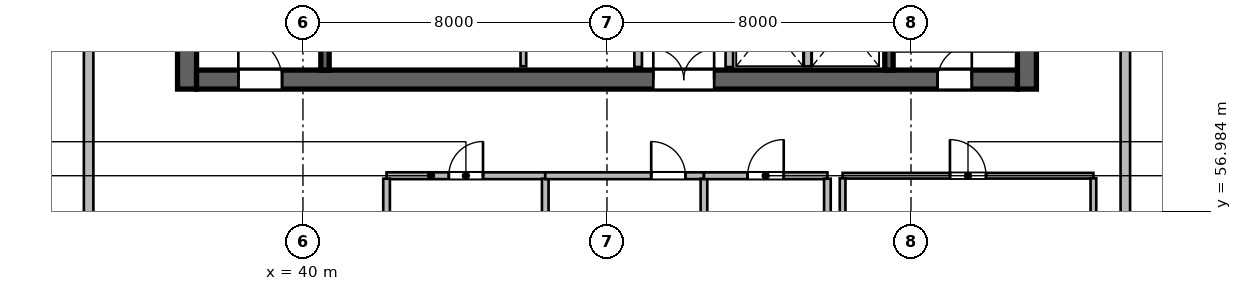
"""IFC4 building model, lengths in metres.
Left out: names, types, materials, properties, quantities, classifications, styles, units other than length and angle.
Written with IfcOpenShell. Run it as: python <this file> out.ifc"""

import sys

from ifc_helpers import new_model, si_unit, direction, frame, frame_2d, origin, place, context, subcontext, project, spatial, rectangle, extrude, source, transform, mapped, element, fill, save


model = new_model("IFC4")
c1 = context("Model", 3, precision=1e-05, world=origin(), true_north=direction((0.0, 1.0)))
c2 = subcontext(c1, "Body", "Model", "MODEL_VIEW")
j1 = project(units=[si_unit("LENGTHUNIT", "METRE"), si_unit("PLANEANGLEUNIT", "RADIAN")], contexts=[c1])
p1 = place(None, origin())
s1 = spatial("IfcSite", under=j1, at=p1, CompositionType="ELEMENT")
p2 = place(p1, origin())
s2 = spatial("IfcBuilding", under=s1, at=p2, CompositionType="ELEMENT")
p3 = place(p2, frame((0.0, 0.0, 177.9)))
s3 = spatial("IfcBuildingStorey", under=s2, at=p3, CompositionType="ELEMENT", Elevation=177.9)
m1 = source(origin(), c2, "Body", "SweptSolid", [
    extrude(rectangle(XDim=12.0, YDim=0.5, at=frame_2d((6.0, 0.0))), origin(), (0.0, 0.0, 1.0), 3.9),
])
for number, where, z_axis, x_axis in (
    (1, (36.95, 60.2, 0.0), (0.0, 0.0, 1.0), (0.0, 1.0, 0.0)),
    (2, (59.05, 60.2, 0.0), (0.0, 0.0, 1.0), (0.0, 1.0, 0.0)),
):
    element("IfcWall", number, at=place(p3, frame(where, z_axis=z_axis, x_axis=x_axis)), inside=s3, PredefinedType="SHEAR", context=c2, shape_type="MappedRepresentation", body=[
        mapped(m1, transform((0.0, 0.0, 0.0), scale=1.0)),
    ])
m2 = source(origin(), c2, "Body", "SweptSolid", [
    extrude(rectangle(XDim=21.6, YDim=0.5, at=frame_2d((10.8, 0.0))), origin(), (0.0, 0.0, 1.0), 3.9),
])
p4 = place(p3, frame((37.2, 60.45, 0.0), z_axis=(0.0, 0.0, 1.0), x_axis=(1.0, 0.0, 0.0)))
e3 = element("IfcWall", 3, at=p4, inside=s3, PredefinedType="SHEAR", context=c2, shape_type="MappedRepresentation", body=[
    mapped(m2, transform((0.0, 0.0, 0.0), scale=1.0)),
])
p5 = place(p4, frame((1.1, 0.0, 0.0)))
e4 = element("IfcOpeningElement", 4, at=p5, cuts=e3, PredefinedType="OPENING", context=c2, shape_type="SweptSolid", body=[
    extrude(rectangle(XDim=1.15, YDim=2.15, at=frame_2d((0.575, 1.075))), frame((0.0, 0.26, 0.0), z_axis=(0.0, -1.0, 0.0), x_axis=(1.0, 0.0, 0.0)), (0.0, 0.0, 1.0), 0.52),
])
p6 = place(p4, frame((19.5, 0.0, 0.0)))
e5 = element("IfcOpeningElement", 5, at=p6, cuts=e3, PredefinedType="OPENING", context=c2, shape_type="SweptSolid", body=[
    extrude(rectangle(XDim=0.9, YDim=2.1, at=frame_2d((0.45, 1.05))), frame((0.0, 0.26, 0.0), z_axis=(0.0, -1.0, 0.0), x_axis=(1.0, 0.0, 0.0)), (0.0, 0.0, 1.0), 0.52),
])
p7 = place(p4, frame((12.02, 0.0, 0.0)))
e6 = element("IfcOpeningElement", 6, at=p7, cuts=e3, PredefinedType="OPENING", context=c2, shape_type="SweptSolid", body=[
    extrude(rectangle(XDim=1.6, YDim=2.15, at=frame_2d((0.8, 1.075))), frame((0.0, 0.26, 0.0), z_axis=(0.0, -1.0, 0.0), x_axis=(1.0, 0.0, 0.0)), (0.0, 0.0, 1.0), 0.52),
])
m3 = source(origin(), c2, "Body", "SweptSolid", [
    extrude(rectangle(XDim=11.0, YDim=0.22, at=frame_2d((5.5, 0.0))), origin(), (0.0, 0.0, 1.0), 3.9),
])
p8 = place(p3, frame((40.58, 60.7, 0.0), z_axis=(0.0, 0.0, 1.0), x_axis=(0.0, 1.0, 0.0)))
e7 = element("IfcWall", 7, at=p8, inside=s3, PredefinedType="SHEAR", context=c2, shape_type="MappedRepresentation", body=[
    mapped(m3, transform((0.0, 0.0, 0.0), scale=1.0)),
])
p9 = place(p3, frame((55.42, 60.7, 0.0), z_axis=(0.0, 0.0, 1.0), x_axis=(0.0, 1.0, 0.0)))
e8 = element("IfcWall", 8, at=p9, inside=s3, PredefinedType="SHEAR", context=c2, shape_type="MappedRepresentation", body=[
    mapped(m3, transform((0.0, 0.0, 0.0), scale=1.0)),
])
p10 = place(p9, frame((9.545, 0.0, 0.0)))
e9 = element("IfcOpeningElement", 9, at=p10, cuts=e8, PredefinedType="OPENING", context=c2, shape_type="SweptSolid", body=[
    extrude(rectangle(XDim=1.15, YDim=2.15, at=frame_2d((0.575, 1.075))), frame((0.0, 0.12, 0.0), z_axis=(0.0, -1.0, 0.0), x_axis=(1.0, 0.0, 0.0)), (0.0, 0.0, 1.0), 0.24),
])
m4 = source(origin(), c2, "Body", "SweptSolid", [
    extrude(rectangle(XDim=2.24, YDim=0.2, at=frame_2d((1.12, 0.0))), origin(), (0.0, 0.0, 1.0), 3.65),
])
for number, where, z_axis, x_axis in (
    (10, (48.82, 60.78, 0.0), (0.0, 0.0, 1.0), (0.0, 1.0, 0.0)),
    (11, (51.22, 60.78, 0.0), (0.0, 0.0, 1.0), (0.0, 1.0, 0.0)),
):
    element("IfcWall", number, at=place(p3, frame(where, z_axis=z_axis, x_axis=x_axis)), inside=s3, PredefinedType="SOLIDWALL", context=c2, shape_type="MappedRepresentation", body=[
        mapped(m4, transform((0.0, 0.0, 0.0), scale=1.0)),
    ])
m5 = source(origin(), c2, "Body", "SweptSolid", [
    extrude(rectangle(XDim=2.2, YDim=0.15, at=frame_2d((1.1, 0.0))), origin(), (0.0, 0.0, 1.0), 3.65),
])
p11 = place(p3, frame((45.8, 60.8, 0.0), z_axis=(0.0, 0.0, 1.0), x_axis=(0.0, 1.0, 0.0)))
e12 = element("IfcWall", 12, at=p11, inside=s3, PredefinedType="PARTITIONING", context=c2, shape_type="MappedRepresentation", body=[
    mapped(m5, transform((0.0, 0.0, 0.0), scale=1.0)),
])
m6 = source(origin(), c2, "Body", "SweptSolid", [
    extrude(rectangle(XDim=2.2, YDim=0.2, at=frame_2d((1.1, 0.0))), origin(), (0.0, 0.0, 1.0), 3.65),
])
p12 = place(p3, frame((53.28, 60.8, 0.0), z_axis=(0.0, 0.0, 1.0), x_axis=(0.0, 1.0, 0.0)))
e13 = element("IfcWall", 13, at=p12, inside=s3, PredefinedType="SOLIDWALL", context=c2, shape_type="MappedRepresentation", body=[
    mapped(m6, transform((0.0, 0.0, 0.0), scale=1.0)),
])
m7 = source(origin(), c2, "Body", "SweptSolid", [
    extrude(rectangle(XDim=4.176, YDim=0.18, at=frame_2d((2.088, 0.0))), origin(), (0.0, 0.0, 1.0), 3.65),
])
p13 = place(p3, frame((42.2, 57.92, 0.0), z_axis=(0.0, 0.0, 1.0), x_axis=(1.0, 0.0, 0.0)))
e14 = element("IfcWall", 14, at=p13, inside=s3, PredefinedType="PLUMBINGWALL", context=c2, shape_type="MappedRepresentation", body=[
    mapped(m7, transform((0.0, 0.0, 0.0), scale=1.0)),
])
p14 = place(p13, frame((1.638, 0.0, 0.0)))
e15 = element("IfcOpeningElement", 15, at=p14, cuts=e14, PredefinedType="OPENING", context=c2, shape_type="SweptSolid", body=[
    extrude(rectangle(XDim=0.9, YDim=2.08, at=frame_2d((0.45, 1.04))), frame((0.0, 0.1, 0.0), z_axis=(0.0, -1.0, 0.0), x_axis=(1.0, 0.0, 0.0)), (0.0, 0.0, 1.0), 0.2),
])
m8 = source(origin(), c2, "Body", "SweptSolid", [
    extrude(rectangle(XDim=3.763, YDim=0.175, at=frame_2d((1.881, 0.0))), origin(), (0.0, 0.0, 1.0), 3.65),
])
p15 = place(p3, frame((42.2, 54.079, 0.0), z_axis=(0.0, 0.0, 1.0), x_axis=(0.0, 1.0, 0.0)))
e16 = element("IfcWall", 16, at=p15, inside=s3, PredefinedType="PARTITIONING", context=c2, shape_type="MappedRepresentation", body=[
    mapped(m8, transform((0.0, 0.0, 0.0), scale=1.0)),
])
m9 = source(origin(), c2, "Body", "SweptSolid", [
    extrude(rectangle(XDim=3.065, YDim=0.175, at=frame_2d((1.533, 0.0))), origin(), (0.0, 0.0, 1.0), 3.65),
])
p16 = place(p3, frame((46.376, 54.776, 0.0), z_axis=(0.0, 0.0, 1.0), x_axis=(0.0, 1.0, 0.0)))
e17 = element("IfcWall", 17, at=p16, inside=s3, PredefinedType="PARTITIONING", context=c2, shape_type="MappedRepresentation", body=[
    mapped(m9, transform((0.0, 0.0, 0.0), scale=1.0)),
])
p17 = place(p3, frame((46.376, 57.92, 0.0), z_axis=(0.0, 0.0, 1.0), x_axis=(1.0, 0.0, 0.0)))
e18 = element("IfcWall", 18, at=p17, inside=s3, PredefinedType="PLUMBINGWALL", context=c2, shape_type="MappedRepresentation", body=[
    mapped(m7, transform((0.0, 0.0, 0.0), scale=1.0)),
])
p18 = place(p17, frame((2.788, 0.0, 0.0)))
e19 = element("IfcOpeningElement", 19, at=p18, cuts=e18, PredefinedType="OPENING", context=c2, shape_type="SweptSolid", body=[
    extrude(rectangle(XDim=0.9, YDim=2.08, at=frame_2d((0.45, 1.04))), frame((0.0, 0.1, 0.0), z_axis=(0.0, -1.0, 0.0), x_axis=(1.0, 0.0, 0.0)), (0.0, 0.0, 1.0), 0.2),
])
m10 = source(origin(), c2, "Body", "SweptSolid", [
    extrude(rectangle(XDim=3.136, YDim=0.175, at=frame_2d((1.568, 0.0))), origin(), (0.0, 0.0, 1.0), 3.65),
])
p19 = place(p3, frame((50.552, 54.705, 0.0), z_axis=(0.0, 0.0, 1.0), x_axis=(0.0, 1.0, 0.0)))
e20 = element("IfcWall", 20, at=p19, inside=s3, PredefinedType="PARTITIONING", context=c2, shape_type="MappedRepresentation", body=[
    mapped(m10, transform((0.0, 0.0, 0.0), scale=1.0)),
])
m11 = source(origin(), c2, "Body", "SweptSolid", [
    extrude(rectangle(XDim=3.248, YDim=0.18, at=frame_2d((1.624, 0.0))), origin(), (0.0, 0.0, 1.0), 3.65),
])
p20 = place(p3, frame((50.552, 57.92, 0.0), z_axis=(0.0, 0.0, 1.0), x_axis=(1.0, 0.0, 0.0)))
e21 = element("IfcWall", 21, at=p20, inside=s3, PredefinedType="PLUMBINGWALL", context=c2, shape_type="MappedRepresentation", body=[
    mapped(m11, transform((0.0, 0.0, 0.0), scale=1.0)),
])
p21 = place(p20, frame((1.149, 0.0, 0.0)))
e22 = element("IfcOpeningElement", 22, at=p21, cuts=e21, PredefinedType="OPENING", context=c2, shape_type="SweptSolid", body=[
    extrude(rectangle(XDim=0.95, YDim=2.12, at=frame_2d((0.475, 1.06))), frame((0.0, 0.1, 0.0), z_axis=(0.0, -1.0, 0.0), x_axis=(1.0, 0.0, 0.0)), (0.0, 0.0, 1.0), 0.2),
])
p22 = place(p3, frame((53.8, 54.079, 0.0), z_axis=(0.0, 0.0, 1.0), x_axis=(0.0, 1.0, 0.0)))
e23 = element("IfcWall", 23, at=p22, inside=s3, PredefinedType="PARTITIONING", context=c2, shape_type="MappedRepresentation", body=[
    mapped(m8, transform((0.0, 0.0, 0.0), scale=1.0)),
])
m12 = source(origin(), c2, "Body", "SweptSolid", [
    extrude(rectangle(XDim=6.6, YDim=0.15, at=frame_2d((3.3, 0.0))), origin(), (0.0, 0.0, 1.0), 3.65),
])
p23 = place(p3, frame((54.2, 57.92, 0.0), z_axis=(0.0, 0.0, 1.0), x_axis=(1.0, 0.0, 0.0)))
e24 = element("IfcWall", 24, at=p23, inside=s3, PredefinedType="PARTITIONING", context=c2, shape_type="MappedRepresentation", body=[
    mapped(m12, transform((0.0, 0.0, 0.0), scale=1.0)),
])
p24 = place(p23, frame((2.825, 0.0, 0.0)))
e25 = element("IfcOpeningElement", 25, at=p24, cuts=e24, PredefinedType="OPENING", context=c2, shape_type="SweptSolid", body=[
    extrude(rectangle(XDim=0.95, YDim=2.1, at=frame_2d((0.475, 1.05))), frame((0.0, 0.085, 0.0), z_axis=(0.0, -1.0, 0.0), x_axis=(1.0, 0.0, 0.0)), (0.0, 0.0, 1.0), 0.17),
])
m13 = source(origin(), c2, "Body", "SweptSolid", [
    extrude(rectangle(XDim=3.785, YDim=0.15, at=frame_2d((1.893, 0.0))), origin(), (0.0, 0.0, 1.0), 3.65),
])
for number, where, z_axis, x_axis in (
    (26, (54.2, 54.067, 0.0), (0.0, 0.0, 1.0), (0.0, 1.0, 0.0)),
    (27, (60.8, 54.067, 0.0), (0.0, 0.0, 1.0), (0.0, 1.0, 0.0)),
):
    element("IfcWall", number, at=place(p3, frame(where, z_axis=z_axis, x_axis=x_axis)), inside=s3, PredefinedType="PARTITIONING", context=c2, shape_type="MappedRepresentation", body=[
        mapped(m13, transform((0.0, 0.0, 0.0), scale=1.0)),
    ])
m14 = source(origin(), c2, "Body", "SweptSolid", [
    extrude(rectangle(XDim=12.126, YDim=0.25, at=frame_2d((6.063, 0.0))), origin(), (0.0, 0.0, 1.0), 3.65),
])
p25 = place(p3, frame((34.36, 49.334, 0.0), z_axis=(0.0, 0.0, 1.0), x_axis=(0.0, 1.0, 0.0)))
e28 = element("IfcWall", 28, at=p25, inside=s3, PredefinedType="PARTITIONING", context=c2, shape_type="MappedRepresentation", body=[
    mapped(m14, transform((0.0, 0.0, 0.0), scale=1.0)),
])
m15 = source(origin(), c2, "Body", "SweptSolid", [
    extrude(rectangle(XDim=12.126, YDim=0.25, at=frame_2d((6.063, 0.0))), origin(), (0.0, 0.0, 1.0), 2.942),
])
p26 = place(p3, frame((61.64, 49.334, 0.0), z_axis=(0.0, 0.0, 1.0), x_axis=(0.0, 1.0, 0.0)))
e29 = element("IfcWall", 29, at=p26, inside=s3, PredefinedType="PARTITIONING", context=c2, shape_type="MappedRepresentation", body=[
    mapped(m15, transform((0.0, 0.0, 0.0), scale=1.0)),
])
m16 = source(origin(), c2, "Body", "SweptSolid", [
    extrude(rectangle(XDim=1.15, YDim=2.15, at=frame_2d((0.575, 1.075))), frame((0.0, 0.025, 0.0), z_axis=(0.0, -1.0, 0.0), x_axis=(1.0, 0.0, 0.0)), (0.0, 0.0, 1.0), 0.05),
])
p27 = place(p5, origin())
e30 = element("IfcDoor", 30, at=p27, inside=s3, OperationType="SINGLE_SWING_LEFT", PredefinedType="DOOR", context=c2, shape_type="MappedRepresentation", body=[
    mapped(m16, transform((0.0, 0.0, 0.0), scale=1.0)),
])
fill(e4, e30)
m17 = source(origin(), c2, "Body", "SweptSolid", [
    extrude(rectangle(XDim=0.9, YDim=2.1, at=frame_2d((0.45, 1.05))), frame((0.0, 0.025, 0.0), z_axis=(0.0, -1.0, 0.0), x_axis=(1.0, 0.0, 0.0)), (0.0, 0.0, 1.0), 0.05),
])
p28 = place(p6, origin())
e31 = element("IfcDoor", 31, at=p28, inside=s3, OperationType="SINGLE_SWING_RIGHT", PredefinedType="DOOR", context=c2, shape_type="MappedRepresentation", body=[
    mapped(m17, transform((0.0, 0.0, 0.0), scale=1.0)),
])
fill(e5, e31)
m18 = source(origin(), c2, "Body", "SweptSolid", [
    extrude(rectangle(XDim=1.6, YDim=2.15, at=frame_2d((0.8, 1.075))), frame((0.0, 0.025, 0.0), z_axis=(0.0, -1.0, 0.0), x_axis=(1.0, 0.0, 0.0)), (0.0, 0.0, 1.0), 0.05),
])
p29 = place(p7, origin())
e32 = element("IfcDoor", 32, at=p29, inside=s3, OperationType="DOUBLE_DOOR_SINGLE_SWING", PredefinedType="DOOR", context=c2, shape_type="MappedRepresentation", body=[
    mapped(m18, transform((0.0, 0.0, 0.0), scale=1.0)),
])
fill(e6, e32)
m19 = source(origin(), c2, "Body", "SweptSolid", [
    extrude(rectangle(XDim=0.9, YDim=2.08, at=frame_2d((0.45, 1.04))), frame((0.0, 0.025, 0.0), z_axis=(0.0, -1.0, 0.0), x_axis=(1.0, 0.0, 0.0)), (0.0, 0.0, 1.0), 0.05),
])
p30 = place(p14, origin())
e33 = element("IfcDoor", 33, at=p30, inside=s3, OperationType="SINGLE_SWING_RIGHT", PredefinedType="DOOR", context=c2, shape_type="MappedRepresentation", body=[
    mapped(m19, transform((0.0, 0.0, 0.0), scale=1.0)),
])
fill(e15, e33)
p31 = place(p18, origin())
e34 = element("IfcDoor", 34, at=p31, inside=s3, OperationType="SINGLE_SWING_LEFT", PredefinedType="DOOR", context=c2, shape_type="MappedRepresentation", body=[
    mapped(m19, transform((0.0, 0.0, 0.0), scale=1.0)),
])
fill(e19, e34)
m20 = source(origin(), c2, "Body", "SweptSolid", [
    extrude(rectangle(XDim=0.95, YDim=2.12, at=frame_2d((0.475, 1.06))), frame((0.0, 0.025, 0.0), z_axis=(0.0, -1.0, 0.0), x_axis=(1.0, 0.0, 0.0)), (0.0, 0.0, 1.0), 0.05),
])
p32 = place(p21, origin())
e35 = element("IfcDoor", 35, at=p32, inside=s3, OperationType="SINGLE_SWING_RIGHT", PredefinedType="DOOR", context=c2, shape_type="MappedRepresentation", body=[
    mapped(m20, transform((0.0, 0.0, 0.0), scale=1.0)),
])
fill(e22, e35)
m21 = source(origin(), c2, "Body", "SweptSolid", [
    extrude(rectangle(XDim=0.95, YDim=2.1, at=frame_2d((0.475, 1.05))), frame((0.0, 0.025, 0.0), z_axis=(0.0, -1.0, 0.0), x_axis=(1.0, 0.0, 0.0)), (0.0, 0.0, 1.0), 0.05),
])
p33 = place(p24, origin())
e36 = element("IfcDoor", 36, at=p33, inside=s3, OperationType="SINGLE_SWING_LEFT", PredefinedType="DOOR", context=c2, shape_type="MappedRepresentation", body=[
    mapped(m21, transform((0.0, 0.0, 0.0), scale=1.0)),
])
fill(e25, e36)
save(model, sys.argv[1])
